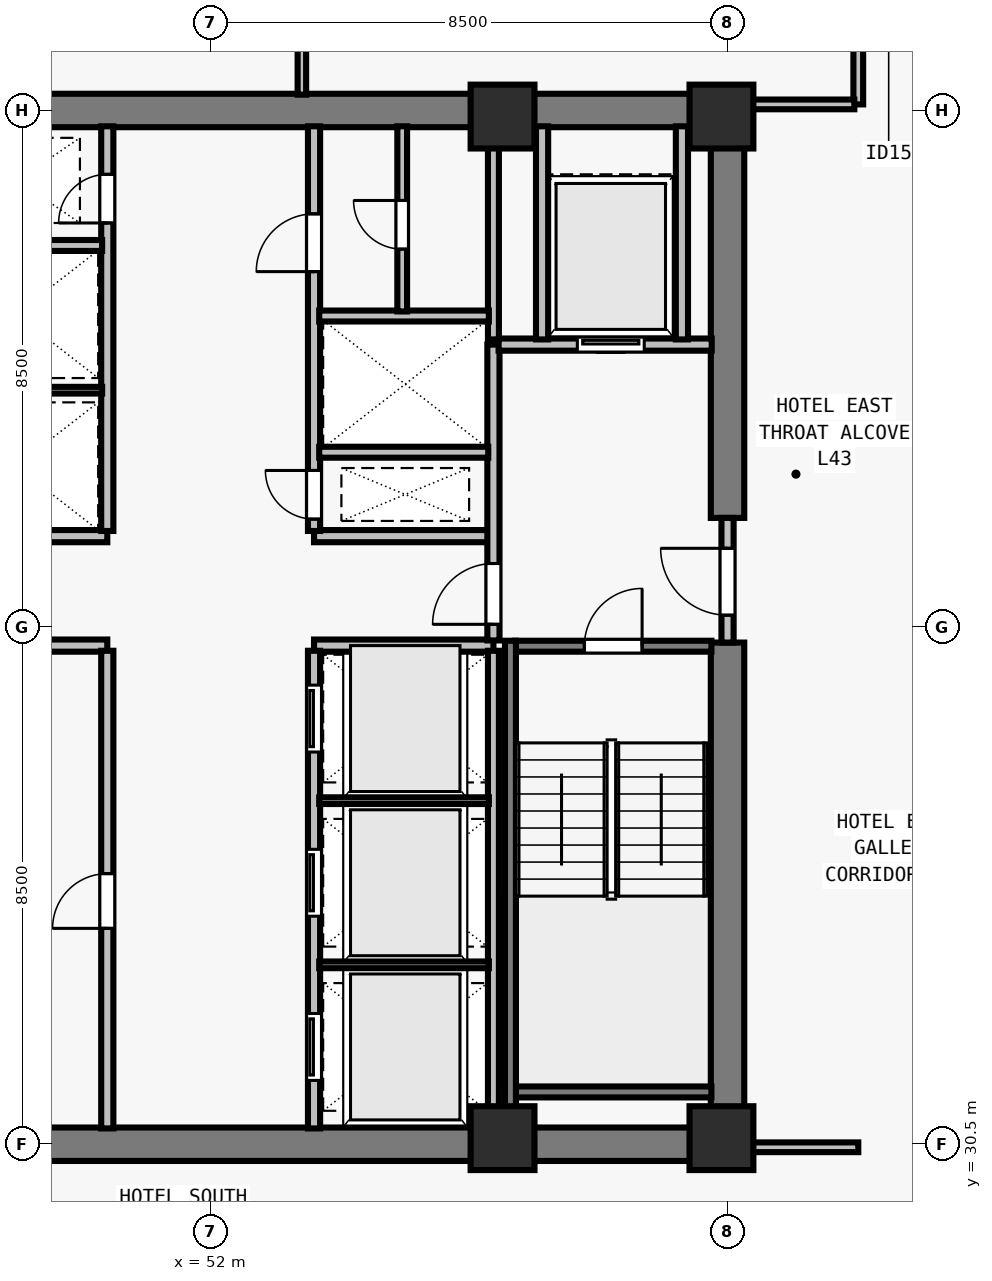
"""IFC4 building model, lengths in metres.
Left out: names, types, materials, properties, quantities, classifications, styles, units other than length and angle.
Written with IfcOpenShell. Run it as: python <this file> out.ifc"""

import sys

from ifc_helpers import new_model, si_unit, direction, frame, frame_2d, origin, origin_2d, place, context, subcontext, project, spatial, rectangle, extrude, element, fill, save


model = new_model("IFC4")
c1 = context("Model", 3, precision=1e-05, world=origin(), true_north=direction((0.0, 1.0)))
c2 = subcontext(c1, "Body", "Model", "MODEL_VIEW")
j1 = project(units=[si_unit("LENGTHUNIT", "METRE"), si_unit("PLANEANGLEUNIT", "RADIAN")], contexts=[c1])
p1 = place(None, origin())
s1 = spatial("IfcSite", under=j1, at=p1, CompositionType="ELEMENT")
p2 = place(p1, origin())
s2 = spatial("IfcBuilding", under=s1, at=p2, CompositionType="ELEMENT")
p3 = place(p2, frame((0.0, 0.0, 158.5)))
s3 = spatial("IfcBuildingStorey", under=s2, at=p3, CompositionType="ELEMENT", Elevation=158.5)
for number, where, z_axis, x_axis in (
    (1, (56.8, 30.6, 0.0), (0.0, 0.0, 1.0), (1.0, 0.0, 0.0)),
    (2, (60.4, 30.6, 0.0), (0.0, 0.0, 1.0), (1.0, 0.0, 0.0)),
    (3, (56.8, 47.4, 0.0), (0.0, 0.0, 1.0), (1.0, 0.0, 0.0)),
    (4, (60.4, 47.4, 0.0), (0.0, 0.0, 1.0), (1.0, 0.0, 0.0)),
):
    element("IfcColumn", number, at=place(p3, frame(where, z_axis=z_axis, x_axis=x_axis)), inside=s3, PredefinedType="COLUMN", context=c2, shape_type="SweptSolid", body=[
        extrude(rectangle(XDim=1.05, YDim=1.05, at=origin_2d()), origin(), (0.0, 0.0, 1.0), 3.5),
    ])
for number, where, z_axis, x_axis in (
    (5, (43.225, 30.5, 0.0), (0.0, 0.0, 1.0), (1.0, 0.0, 0.0)),
    (6, (43.225, 47.5, 0.0), (0.0, 0.0, 1.0), (1.0, 0.0, 0.0)),
):
    element("IfcWall", number, at=place(p3, frame(where, z_axis=z_axis, x_axis=x_axis)), inside=s3, PredefinedType="SHEAR", context=c2, shape_type="SweptSolid", body=[
        extrude(rectangle(XDim=17.55, YDim=0.55, at=frame_2d((8.775, 0.0))), origin(), (0.0, 0.0, 1.0), 3.28),
    ])
p4 = place(p3, frame((60.5, 30.765, 0.0), z_axis=(0.0, 0.0, 1.0), x_axis=(0.0, 1.0, 0.0)))
e7 = element("IfcWall", 7, at=p4, inside=s3, PredefinedType="SHEAR", context=c2, shape_type="SweptSolid", body=[
    extrude(rectangle(XDim=7.985, YDim=0.55, at=frame_2d((3.993, 0.0))), origin(), (0.0, 0.0, 1.0), 3.28),
])
p5 = place(p3, frame((60.5, 40.8, 0.0), z_axis=(0.0, 0.0, 1.0), x_axis=(0.0, 1.0, 0.0)))
e8 = element("IfcWall", 8, at=p5, inside=s3, PredefinedType="SHEAR", context=c2, shape_type="SweptSolid", body=[
    extrude(rectangle(XDim=6.435, YDim=0.55, at=frame_2d((3.218, 0.0))), origin(), (0.0, 0.0, 1.0), 3.28),
])
for number, where, z_axis, x_axis in (
    (9, (47.35, 38.7, 0.0), (0.0, 0.0, 1.0), (1.0, 0.0, 0.0)),
    (10, (47.35, 40.5, 0.0), (0.0, 0.0, 1.0), (1.0, 0.0, 0.0)),
    (11, (53.7, 38.7, 0.0), (0.0, 0.0, 1.0), (1.0, 0.0, 0.0)),
    (12, (53.7, 40.5, 0.0), (0.0, 0.0, 1.0), (1.0, 0.0, 0.0)),
):
    element("IfcWall", number, at=place(p3, frame(where, z_axis=z_axis, x_axis=x_axis)), inside=s3, PredefinedType="SOLIDWALL", context=c2, shape_type="SweptSolid", body=[
        extrude(rectangle(XDim=2.95, YDim=0.2, at=frame_2d((1.475, 0.0))), origin(), (0.0, 0.0, 1.0), 3.28),
    ])
p6 = place(p3, frame((50.3, 30.76, 0.0), z_axis=(0.0, 0.0, 1.0), x_axis=(0.0, 1.0, 0.0)))
e13 = element("IfcWall", 13, at=p6, inside=s3, PredefinedType="SOLIDWALL", context=c2, shape_type="SweptSolid", body=[
    extrude(rectangle(XDim=7.855, YDim=0.2, at=frame_2d((3.927, 0.0))), origin(), (0.0, 0.0, 1.0), 3.28),
])
p7 = place(p6, frame((3.29, 0.0, 0.0)))
e14 = element("IfcOpeningElement", 14, at=p7, cuts=e13, PredefinedType="OPENING", context=c2, shape_type="SweptSolid", body=[
    extrude(rectangle(XDim=0.9, YDim=2.12, at=frame_2d((0.45, 1.06))), frame((0.0, 0.11, 0.0), z_axis=(0.0, -1.0, 0.0), x_axis=(1.0, 0.0, 0.0)), (0.0, 0.0, 1.0), 0.22),
])
p8 = place(p3, frame((53.7, 30.76, 0.0), z_axis=(0.0, 0.0, 1.0), x_axis=(0.0, 1.0, 0.0)))
e15 = element("IfcWall", 15, at=p8, inside=s3, PredefinedType="SOLIDWALL", context=c2, shape_type="SweptSolid", body=[
    extrude(rectangle(XDim=7.855, YDim=0.2, at=frame_2d((3.927, 0.0))), origin(), (0.0, 0.0, 1.0), 3.28),
])
p9 = place(p8, frame((0.79, 0.0, 0.0)))
e16 = element("IfcOpeningElement", 16, at=p9, cuts=e15, PredefinedType="OPENING", context=c2, shape_type="SweptSolid", body=[
    extrude(rectangle(XDim=1.1, YDim=2.2, at=frame_2d((0.55, 1.1))), frame((0.0, 0.11, 0.0), z_axis=(0.0, -1.0, 0.0), x_axis=(1.0, 0.0, 0.0)), (0.0, 0.0, 1.0), 0.22),
])
p10 = place(p8, frame((3.49, 0.0, 0.0)))
e17 = element("IfcOpeningElement", 17, at=p10, cuts=e15, PredefinedType="OPENING", context=c2, shape_type="SweptSolid", body=[
    extrude(rectangle(XDim=1.1, YDim=2.2, at=frame_2d((0.55, 1.1))), frame((0.0, 0.11, 0.0), z_axis=(0.0, -1.0, 0.0), x_axis=(1.0, 0.0, 0.0)), (0.0, 0.0, 1.0), 0.22),
])
p11 = place(p8, frame((6.19, 0.0, 0.0)))
e18 = element("IfcOpeningElement", 18, at=p11, cuts=e15, PredefinedType="OPENING", context=c2, shape_type="SweptSolid", body=[
    extrude(rectangle(XDim=1.1, YDim=2.2, at=frame_2d((0.55, 1.1))), frame((0.0, 0.11, 0.0), z_axis=(0.0, -1.0, 0.0), x_axis=(1.0, 0.0, 0.0)), (0.0, 0.0, 1.0), 0.22),
])
p12 = place(p3, frame((50.3, 40.585, 0.0), z_axis=(0.0, 0.0, 1.0), x_axis=(0.0, 1.0, 0.0)))
e19 = element("IfcWall", 19, at=p12, inside=s3, PredefinedType="SOLIDWALL", context=c2, shape_type="SweptSolid", body=[
    extrude(rectangle(XDim=6.655, YDim=0.2, at=frame_2d((3.328, 0.0))), origin(), (0.0, 0.0, 1.0), 3.28),
])
p13 = place(p12, frame((5.065, 0.0, 0.0)))
e20 = element("IfcOpeningElement", 20, at=p13, cuts=e19, PredefinedType="OPENING", context=c2, shape_type="SweptSolid", body=[
    extrude(rectangle(XDim=0.8, YDim=2.08, at=frame_2d((0.4, 1.04))), frame((0.0, 0.11, 0.0), z_axis=(0.0, -1.0, 0.0), x_axis=(1.0, 0.0, 0.0)), (0.0, 0.0, 1.0), 0.22),
])
p14 = place(p3, frame((53.7, 40.585, 0.0), z_axis=(0.0, 0.0, 1.0), x_axis=(0.0, 1.0, 0.0)))
e21 = element("IfcWall", 21, at=p14, inside=s3, PredefinedType="SOLIDWALL", context=c2, shape_type="SweptSolid", body=[
    extrude(rectangle(XDim=6.655, YDim=0.2, at=frame_2d((3.328, 0.0))), origin(), (0.0, 0.0, 1.0), 3.28),
])
p15 = place(p14, frame((0.195, 0.0, 0.0)))
e22 = element("IfcOpeningElement", 22, at=p15, cuts=e21, PredefinedType="OPENING", context=c2, shape_type="SweptSolid", body=[
    extrude(rectangle(XDim=0.8, YDim=2.08, at=frame_2d((0.4, 1.04))), frame((0.0, 0.11, 0.0), z_axis=(0.0, -1.0, 0.0), x_axis=(1.0, 0.0, 0.0)), (0.0, 0.0, 1.0), 0.22),
])
p16 = place(p14, frame((4.265, 0.0, 0.0)))
e23 = element("IfcOpeningElement", 23, at=p16, cuts=e21, PredefinedType="OPENING", context=c2, shape_type="SweptSolid", body=[
    extrude(rectangle(XDim=0.95, YDim=2.12, at=frame_2d((0.475, 1.06))), frame((0.0, 0.11, 0.0), z_axis=(0.0, -1.0, 0.0), x_axis=(1.0, 0.0, 0.0)), (0.0, 0.0, 1.0), 0.22),
])
p17 = place(p3, frame((60.5, 38.75, 0.0), z_axis=(0.0, 0.0, 1.0), x_axis=(0.0, 1.0, 0.0)))
e24 = element("IfcWall", 24, at=p17, inside=s3, PredefinedType="SOLIDWALL", context=c2, shape_type="SweptSolid", body=[
    extrude(rectangle(XDim=2.05, YDim=0.2, at=frame_2d((1.025, 0.0))), origin(), (0.0, 0.0, 1.0), 3.28),
])
p18 = place(p17, frame((0.45, 0.0, 0.0)))
e25 = element("IfcOpeningElement", 25, at=p18, cuts=e24, PredefinedType="OPENING", context=c2, shape_type="SweptSolid", body=[
    extrude(rectangle(XDim=1.1, YDim=2.15, at=frame_2d((0.55, 1.075))), frame((0.0, 0.11, 0.0), z_axis=(0.0, -1.0, 0.0), x_axis=(1.0, 0.0, 0.0)), (0.0, 0.0, 1.0), 0.22),
])
p19 = place(p3, frame((56.65, 38.785, 0.0), z_axis=(0.0, 0.0, 1.0), x_axis=(0.0, 1.0, 0.0)))
e26 = element("IfcWall", 26, at=p19, inside=s3, PredefinedType="SOLIDWALL", context=c2, shape_type="SweptSolid", body=[
    extrude(rectangle(XDim=4.865, YDim=0.2, at=frame_2d((2.433, 0.0))), origin(), (0.0, 0.0, 1.0), 3.28),
])
p20 = place(p19, frame((0.265, 0.0, 0.0)))
e27 = element("IfcOpeningElement", 27, at=p20, cuts=e26, PredefinedType="OPENING", context=c2, shape_type="SweptSolid", body=[
    extrude(rectangle(XDim=1.0, YDim=2.15, at=frame_2d((0.5, 1.075))), frame((0.0, 0.11, 0.0), z_axis=(0.0, -1.0, 0.0), x_axis=(1.0, 0.0, 0.0)), (0.0, 0.0, 1.0), 0.22),
])
p21 = place(p3, frame((56.735, 43.65, 0.0), z_axis=(0.0, 0.0, 1.0), x_axis=(1.0, 0.0, 0.0)))
e28 = element("IfcWall", 28, at=p21, inside=s3, PredefinedType="SOLIDWALL", context=c2, shape_type="SweptSolid", body=[
    extrude(rectangle(XDim=3.505, YDim=0.2, at=frame_2d((1.752, 0.0))), origin(), (0.0, 0.0, 1.0), 3.28),
])
p22 = place(p21, frame((1.295, 0.0, 0.0)))
e29 = element("IfcOpeningElement", 29, at=p22, cuts=e28, PredefinedType="OPENING", context=c2, shape_type="SweptSolid", body=[
    extrude(rectangle(XDim=1.1, YDim=2.2, at=frame_2d((0.55, 1.1))), frame((0.0, 0.11, 0.0), z_axis=(0.0, -1.0, 0.0), x_axis=(1.0, 0.0, 0.0)), (0.0, 0.0, 1.0), 0.22),
])
for number, where, z_axis, x_axis in (
    (30, (57.45, 43.735, 0.0), (0.0, 0.0, 1.0), (0.0, 1.0, 0.0)),
    (31, (59.75, 43.735, 0.0), (0.0, 0.0, 1.0), (0.0, 1.0, 0.0)),
):
    element("IfcWall", number, at=place(p3, frame(where, z_axis=z_axis, x_axis=x_axis)), inside=s3, PredefinedType="SOLIDWALL", context=c2, shape_type="SweptSolid", body=[
        extrude(rectangle(XDim=3.505, YDim=0.2, at=frame_2d((1.752, 0.0))), origin(), (0.0, 0.0, 1.0), 3.28),
    ])
p23 = place(p3, frame((56.65, 30.76, 0.0), z_axis=(0.0, 0.0, 1.0), x_axis=(0.0, 1.0, 0.0)))
e32 = element("IfcWall", 32, at=p23, inside=s3, PredefinedType="SOLIDWALL", context=c2, shape_type="SweptSolid", body=[
    extrude(rectangle(XDim=7.855, YDim=0.18, at=frame_2d((3.927, 0.0))), origin(), (0.0, 0.0, 1.0), 3.28),
])
for number, where, z_axis, x_axis in (
    (33, (53.785, 33.45, 0.0), (0.0, 0.0, 1.0), (1.0, 0.0, 0.0)),
    (34, (53.785, 36.15, 0.0), (0.0, 0.0, 1.0), (1.0, 0.0, 0.0)),
):
    element("IfcWall", number, at=place(p3, frame(where, z_axis=z_axis, x_axis=x_axis)), inside=s3, PredefinedType="PARTITIONING", context=c2, shape_type="SweptSolid", body=[
        extrude(rectangle(XDim=2.79, YDim=0.11, at=frame_2d((1.395, 0.0))), origin(), (0.0, 0.0, 1.0), 3.28),
    ])
p24 = place(p3, frame((47.435, 42.9, 0.0), z_axis=(0.0, 0.0, 1.0), x_axis=(1.0, 0.0, 0.0)))
e35 = element("IfcWall", 35, at=p24, inside=s3, PredefinedType="PARTITIONING", context=c2, shape_type="SweptSolid", body=[
    extrude(rectangle(XDim=2.78, YDim=0.11, at=frame_2d((1.39, 0.0))), origin(), (0.0, 0.0, 1.0), 3.28),
])
p25 = place(p3, frame((47.425, 45.28, 0.0), z_axis=(0.0, 0.0, 1.0), x_axis=(1.0, 0.0, 0.0)))
e36 = element("IfcWall", 36, at=p25, inside=s3, PredefinedType="SOLIDWALL", context=c2, shape_type="SweptSolid", body=[
    extrude(rectangle(XDim=2.79, YDim=0.18, at=frame_2d((1.395, 0.0))), origin(), (0.0, 0.0, 1.0), 3.28),
])
p26 = place(p3, frame((56.65, 43.735, 0.0), z_axis=(0.0, 0.0, 1.0), x_axis=(0.0, 1.0, 0.0)))
e37 = element("IfcWall", 37, at=p26, inside=s3, PredefinedType="SOLIDWALL", context=c2, shape_type="SweptSolid", body=[
    extrude(rectangle(XDim=3.505, YDim=0.18, at=frame_2d((1.752, 0.0))), origin(), (0.0, 0.0, 1.0), 3.28),
])
p27 = place(p3, frame((53.785, 41.88, 0.0), z_axis=(0.0, 0.0, 1.0), x_axis=(1.0, 0.0, 0.0)))
e38 = element("IfcWall", 38, at=p27, inside=s3, PredefinedType="SOLIDWALL", context=c2, shape_type="SweptSolid", body=[
    extrude(rectangle(XDim=2.78, YDim=0.18, at=frame_2d((1.39, 0.0))), origin(), (0.0, 0.0, 1.0), 3.28),
])
p28 = place(p3, frame((53.785, 44.12, 0.0), z_axis=(0.0, 0.0, 1.0), x_axis=(1.0, 0.0, 0.0)))
e39 = element("IfcWall", 39, at=p28, inside=s3, PredefinedType="SOLIDWALL", context=c2, shape_type="SweptSolid", body=[
    extrude(rectangle(XDim=2.79, YDim=0.18, at=frame_2d((1.395, 0.0))), origin(), (0.0, 0.0, 1.0), 3.28),
])
p29 = place(p3, frame((55.15, 44.195, 0.0), z_axis=(0.0, 0.0, 1.0), x_axis=(0.0, 1.0, 0.0)))
e40 = element("IfcWall", 40, at=p29, inside=s3, PredefinedType="PARTITIONING", context=c2, shape_type="SweptSolid", body=[
    extrude(rectangle(XDim=3.045, YDim=0.16, at=frame_2d((1.522, 0.0))), origin(), (0.0, 0.0, 1.0), 3.28),
])
p30 = place(p29, frame((1.025, 0.0, 0.0)))
e41 = element("IfcOpeningElement", 41, at=p30, cuts=e40, PredefinedType="OPENING", context=c2, shape_type="SweptSolid", body=[
    extrude(rectangle(XDim=0.8, YDim=2.1, at=frame_2d((0.4, 1.05))), frame((0.0, 0.09, 0.0), z_axis=(0.0, -1.0, 0.0), x_axis=(1.0, 0.0, 0.0)), (0.0, 0.0, 1.0), 0.18),
])
p31 = place(p3, frame((62.65, 47.6, 0.0), z_axis=(0.0, 0.0, 1.0), x_axis=(0.0, 1.0, 0.0)))
e42 = element("IfcWall", 42, at=p31, inside=s3, PredefinedType="PARTITIONING", context=c2, shape_type="SweptSolid", body=[
    extrude(rectangle(XDim=15.075, YDim=0.16, at=frame_2d((7.538, 0.0))), origin(), (0.0, 0.0, 1.0), 2.555),
])
p32 = place(p31, frame((1.6, 0.0, 0.0)))
e43 = element("IfcOpeningElement", 43, at=p32, cuts=e42, PredefinedType="OPENING", context=c2, shape_type="SweptSolid", body=[
    extrude(rectangle(XDim=0.92, YDim=2.12, at=frame_2d((0.46, 1.06))), frame((0.0, 0.09, 0.0), z_axis=(0.0, -1.0, 0.0), x_axis=(1.0, 0.0, 0.0)), (0.0, 0.0, 1.0), 0.18),
])
p33 = place(p31, frame((6.2, 0.0, 0.0)))
e44 = element("IfcOpeningElement", 44, at=p33, cuts=e42, PredefinedType="OPENING", context=c2, shape_type="SweptSolid", body=[
    extrude(rectangle(XDim=0.96, YDim=2.12, at=frame_2d((0.48, 1.06))), frame((0.0, 0.09, 0.0), z_axis=(0.0, -1.0, 0.0), x_axis=(1.0, 0.0, 0.0)), (0.0, 0.0, 1.0), 0.18),
])
p34 = place(p3, frame((60.765, 30.45, 0.0), z_axis=(0.0, 0.0, 1.0), x_axis=(1.0, 0.0, 0.0)))
e45 = element("IfcWall", 45, at=p34, inside=s3, PredefinedType="PARTITIONING", context=c2, shape_type="SweptSolid", body=[
    extrude(rectangle(XDim=1.885, YDim=0.16, at=frame_2d((0.942, 0.0))), origin(), (0.0, 0.0, 1.0), 3.28),
])
p35 = place(p3, frame((60.765, 47.6, 0.0), z_axis=(0.0, 0.0, 1.0), x_axis=(1.0, 0.0, 0.0)))
e46 = element("IfcWall", 46, at=p35, inside=s3, PredefinedType="PARTITIONING", context=c2, shape_type="SweptSolid", body=[
    extrude(rectangle(XDim=1.82, YDim=0.16, at=frame_2d((0.91, 0.0))), origin(), (0.0, 0.0, 1.0), 3.28),
])
p36 = place(p3, frame((53.5, 47.76, 0.0), z_axis=(0.0, 0.0, 1.0), x_axis=(0.0, 1.0, 0.0)))
e47 = element("IfcWall", 47, at=p36, inside=s3, PredefinedType="PARTITIONING", context=c2, shape_type="SweptSolid", body=[
    extrude(rectangle(XDim=14.915, YDim=0.14, at=frame_2d((7.458, 0.0))), origin(), (0.0, 0.0, 1.0), 2.896),
])
p37 = place(p3, frame((57.005, 38.69, 0.0), z_axis=(0.0, 0.0, 1.0), x_axis=(1.0, 0.0, 0.0)))
e48 = element("IfcWall", 48, at=p37, inside=s3, PredefinedType="SOLIDWALL", context=c2, shape_type="SweptSolid", body=[
    extrude(rectangle(XDim=3.23, YDim=0.18, at=frame_2d((1.615, 0.0))), origin(), (0.0, 0.0, 1.0), 3.28),
])
p38 = place(p37, frame((1.14, 0.0, 0.0)))
e49 = element("IfcOpeningElement", 49, at=p38, cuts=e48, PredefinedType="OPENING", context=c2, shape_type="SweptSolid", body=[
    extrude(rectangle(XDim=0.95, YDim=2.15, at=frame_2d((0.475, 1.075))), frame((0.0, 0.1, 0.0), z_axis=(0.0, -1.0, 0.0), x_axis=(1.0, 0.0, 0.0)), (0.0, 0.0, 1.0), 0.2),
])
p39 = place(p3, frame((57.005, 31.36, 0.0), z_axis=(0.0, 0.0, 1.0), x_axis=(1.0, 0.0, 0.0)))
e50 = element("IfcWall", 50, at=p39, inside=s3, PredefinedType="SOLIDWALL", context=c2, shape_type="SweptSolid", body=[
    extrude(rectangle(XDim=3.23, YDim=0.18, at=frame_2d((1.615, 0.0))), origin(), (0.0, 0.0, 1.0), 3.28),
])
p40 = place(p3, frame((56.93, 38.78, 0.0), z_axis=(0.0, 0.0, 1.0), x_axis=(0.0, -1.0, 0.0)))
e51 = element("IfcWall", 51, at=p40, inside=s3, PredefinedType="SOLIDWALL", context=c2, shape_type="SweptSolid", body=[
    extrude(rectangle(XDim=8.017, YDim=0.18, at=frame_2d((4.009, 0.0))), origin(), (0.0, 0.0, 1.0), 3.28),
])
p41 = place(p18, origin())
e52 = element("IfcDoor", 52, at=p41, inside=s3, OperationType="SINGLE_SWING_RIGHT", PredefinedType="DOOR", context=c2, shape_type="SweptSolid", body=[
    extrude(rectangle(XDim=1.1, YDim=2.15, at=frame_2d((0.55, 1.075))), frame((0.0, 0.025, 0.0), z_axis=(0.0, -1.0, 0.0), x_axis=(1.0, 0.0, 0.0)), (0.0, 0.0, 1.0), 0.05),
])
fill(e25, e52)
p42 = place(p20, origin())
e53 = element("IfcDoor", 53, at=p42, inside=s3, OperationType="SINGLE_SWING_LEFT", PredefinedType="DOOR", context=c2, shape_type="SweptSolid", body=[
    extrude(rectangle(XDim=1.0, YDim=2.15, at=frame_2d((0.5, 1.075))), frame((0.0, 0.025, 0.0), z_axis=(0.0, -1.0, 0.0), x_axis=(1.0, 0.0, 0.0)), (0.0, 0.0, 1.0), 0.05),
])
fill(e27, e53)
p43 = place(p22, origin())
e54 = element("IfcDoor", 54, at=p43, inside=s3, OperationType="SLIDING_TO_LEFT", PredefinedType="DOOR", context=c2, shape_type="SweptSolid", body=[
    extrude(rectangle(XDim=1.1, YDim=2.2, at=frame_2d((0.55, 1.1))), frame((0.0, 0.025, 0.0), z_axis=(0.0, -1.0, 0.0), x_axis=(1.0, 0.0, 0.0)), (0.0, 0.0, 1.0), 0.05),
])
fill(e29, e54)
p44 = place(p7, origin())
e55 = element("IfcDoor", 55, at=p44, inside=s3, OperationType="SINGLE_SWING_LEFT", PredefinedType="DOOR", context=c2, shape_type="SweptSolid", body=[
    extrude(rectangle(XDim=0.9, YDim=2.12, at=frame_2d((0.45, 1.06))), frame((0.0, 0.025, 0.0), z_axis=(0.0, -1.0, 0.0), x_axis=(1.0, 0.0, 0.0)), (0.0, 0.0, 1.0), 0.05),
])
fill(e14, e55)
p45 = place(p9, origin())
e56 = element("IfcDoor", 56, at=p45, inside=s3, OperationType="SLIDING_TO_LEFT", PredefinedType="DOOR", context=c2, shape_type="SweptSolid", body=[
    extrude(rectangle(XDim=1.1, YDim=2.2, at=frame_2d((0.55, 1.1))), frame((0.0, 0.025, 0.0), z_axis=(0.0, -1.0, 0.0), x_axis=(1.0, 0.0, 0.0)), (0.0, 0.0, 1.0), 0.05),
])
fill(e16, e56)
p46 = place(p10, origin())
e57 = element("IfcDoor", 57, at=p46, inside=s3, OperationType="SLIDING_TO_LEFT", PredefinedType="DOOR", context=c2, shape_type="SweptSolid", body=[
    extrude(rectangle(XDim=1.1, YDim=2.2, at=frame_2d((0.55, 1.1))), frame((0.0, 0.025, 0.0), z_axis=(0.0, -1.0, 0.0), x_axis=(1.0, 0.0, 0.0)), (0.0, 0.0, 1.0), 0.05),
])
fill(e17, e57)
p47 = place(p11, origin())
e58 = element("IfcDoor", 58, at=p47, inside=s3, OperationType="SLIDING_TO_LEFT", PredefinedType="DOOR", context=c2, shape_type="SweptSolid", body=[
    extrude(rectangle(XDim=1.1, YDim=2.2, at=frame_2d((0.55, 1.1))), frame((0.0, 0.025, 0.0), z_axis=(0.0, -1.0, 0.0), x_axis=(1.0, 0.0, 0.0)), (0.0, 0.0, 1.0), 0.05),
])
fill(e18, e58)
p48 = place(p13, origin())
e59 = element("IfcDoor", 59, at=p48, inside=s3, OperationType="SINGLE_SWING_LEFT", PredefinedType="DOOR", context=c2, shape_type="SweptSolid", body=[
    extrude(rectangle(XDim=0.8, YDim=2.08, at=frame_2d((0.4, 1.04))), frame((0.0, 0.025, 0.0), z_axis=(0.0, -1.0, 0.0), x_axis=(1.0, 0.0, 0.0)), (0.0, 0.0, 1.0), 0.05),
])
fill(e20, e59)
p49 = place(p15, origin())
e60 = element("IfcDoor", 60, at=p49, inside=s3, OperationType="SINGLE_SWING_RIGHT", PredefinedType="DOOR", context=c2, shape_type="SweptSolid", body=[
    extrude(rectangle(XDim=0.8, YDim=2.08, at=frame_2d((0.4, 1.04))), frame((0.0, 0.025, 0.0), z_axis=(0.0, -1.0, 0.0), x_axis=(1.0, 0.0, 0.0)), (0.0, 0.0, 1.0), 0.05),
])
fill(e22, e60)
p50 = place(p16, origin())
e61 = element("IfcDoor", 61, at=p50, inside=s3, OperationType="SINGLE_SWING_LEFT", PredefinedType="DOOR", context=c2, shape_type="SweptSolid", body=[
    extrude(rectangle(XDim=0.95, YDim=2.12, at=frame_2d((0.475, 1.06))), frame((0.0, 0.025, 0.0), z_axis=(0.0, -1.0, 0.0), x_axis=(1.0, 0.0, 0.0)), (0.0, 0.0, 1.0), 0.05),
])
fill(e23, e61)
p51 = place(p30, origin())
e62 = element("IfcDoor", 62, at=p51, inside=s3, OperationType="SINGLE_SWING_RIGHT", PredefinedType="DOOR", context=c2, shape_type="SweptSolid", body=[
    extrude(rectangle(XDim=0.8, YDim=2.1, at=frame_2d((0.4, 1.05))), frame((0.0, 0.025, 0.0), z_axis=(0.0, -1.0, 0.0), x_axis=(1.0, 0.0, 0.0)), (0.0, 0.0, 1.0), 0.05),
])
fill(e41, e62)
p52 = place(p38, origin())
e63 = element("IfcDoor", 63, at=p52, inside=s3, OperationType="SINGLE_SWING_RIGHT", PredefinedType="DOOR", context=c2, shape_type="SweptSolid", body=[
    extrude(rectangle(XDim=0.95, YDim=2.15, at=frame_2d((0.475, 1.075))), frame((0.0, 0.025, 0.0), z_axis=(0.0, -1.0, 0.0), x_axis=(1.0, 0.0, 0.0)), (0.0, 0.0, 1.0), 0.05),
])
fill(e49, e63)
save(model, sys.argv[1])
